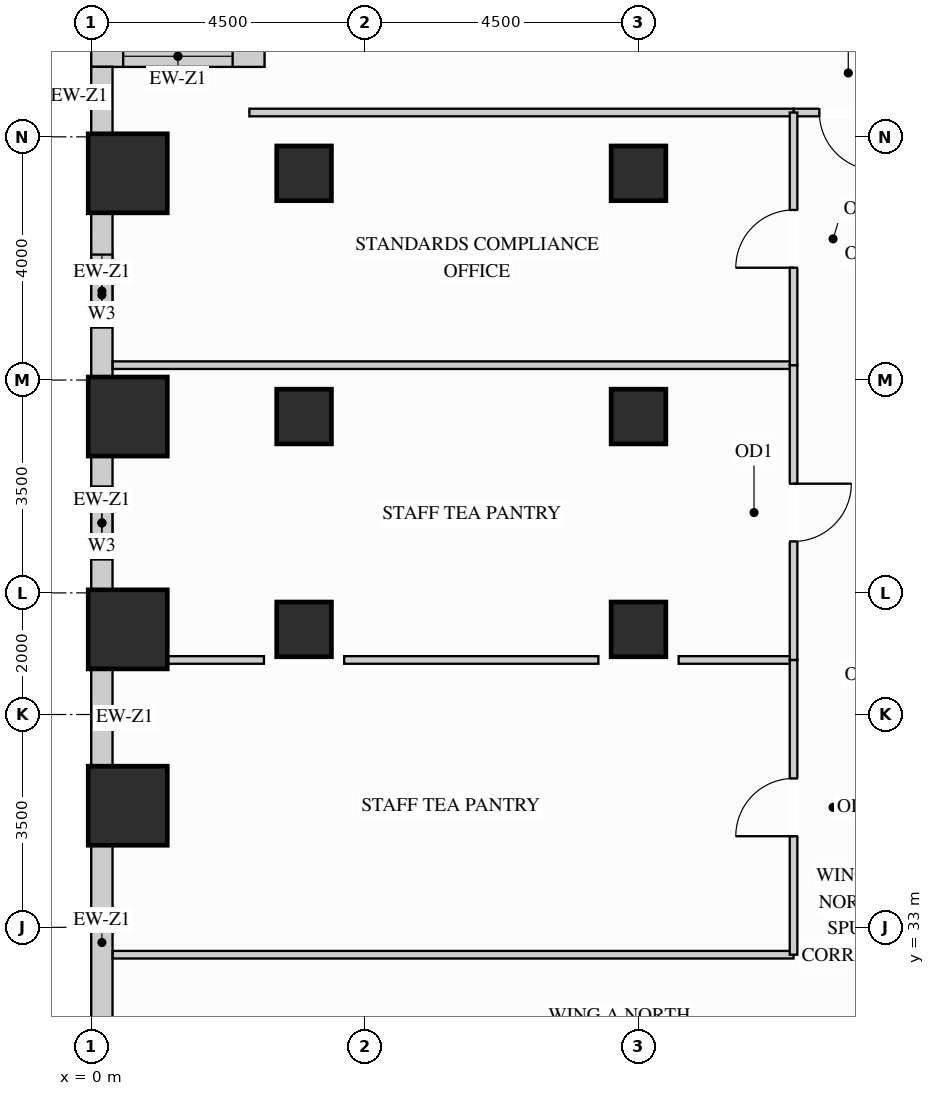
"""IFC4 building model, lengths in metres.
Left out: names, types, materials, properties, quantities, classifications, styles, units other than length and angle.
Written with IfcOpenShell. Run it as: python <this file> out.ifc"""

import sys

from ifc_helpers import new_model, si_unit, direction, frame, frame_2d, origin, origin_2d, place, context, subcontext, project, spatial, rectangle, extrude, source, transform, mapped, element, fill, save


model = new_model("IFC4")
c1 = context("Model", 3, precision=1e-05, world=origin(), true_north=direction((0.0, 1.0)))
c2 = subcontext(c1, "Body", "Model", "MODEL_VIEW")
j1 = project(units=[si_unit("LENGTHUNIT", "METRE"), si_unit("PLANEANGLEUNIT", "RADIAN")], contexts=[c1])
p1 = place(None, origin())
s1 = spatial("IfcSite", under=j1, at=p1, CompositionType="ELEMENT")
p2 = place(p1, origin())
s2 = spatial("IfcBuilding", under=s1, at=p2, CompositionType="ELEMENT")
p3 = place(p2, frame((0.0, 0.0, 26.1)))
s3 = spatial("IfcBuildingStorey", under=s2, at=p3, CompositionType="ELEMENT", Elevation=26.1)
m1 = source(origin(), c2, "Body", "SweptSolid", [
    extrude(rectangle(XDim=0.9, YDim=0.9, at=origin_2d()), origin(), (0.0, 0.0, 1.0), 3.38),
])
for number, where, z_axis, x_axis in (
    (1, (3.5, 37.9, 0.0), (0.0, 0.0, 1.0), (1.0, 0.0, 0.0)),
    (2, (3.5, 41.4, 0.0), (0.0, 0.0, 1.0), (1.0, 0.0, 0.0)),
    (3, (3.5, 45.4, 0.0), (0.0, 0.0, 1.0), (1.0, 0.0, 0.0)),
    (4, (9.0, 37.9, 0.0), (0.0, 0.0, 1.0), (1.0, 0.0, 0.0)),
    (5, (9.0, 41.4, 0.0), (0.0, 0.0, 1.0), (1.0, 0.0, 0.0)),
    (6, (9.0, 45.4, 0.0), (0.0, 0.0, 1.0), (1.0, 0.0, 0.0)),
):
    element("IfcColumn", number, at=place(p3, frame(where, z_axis=z_axis, x_axis=x_axis)), inside=s3, PredefinedType="COLUMN", context=c2, shape_type="MappedRepresentation", body=[
        mapped(m1, transform((0.0, 0.0, 0.0), x_axis=(1.0, 0.0, 0.0), y_axis=(0.0, 1.0, 0.0), z_axis=(0.0, 0.0, 1.0))),
    ])
m2 = source(origin(), c2, "Body", "SweptSolid", [
    extrude(rectangle(XDim=1.3, YDim=1.3, at=origin_2d()), origin(), (0.0, 0.0, 1.0), 3.38),
])
for number, where, z_axis, x_axis in (
    (7, (0.6, 35.0, 0.0), (0.0, 0.0, 1.0), (1.0, 0.0, 0.0)),
    (8, (0.6, 37.9, 0.0), (0.0, 0.0, 1.0), (1.0, 0.0, 0.0)),
    (9, (0.6, 41.4, 0.0), (0.0, 0.0, 1.0), (1.0, 0.0, 0.0)),
    (10, (0.6, 45.4, 0.0), (0.0, 0.0, 1.0), (1.0, 0.0, 0.0)),
):
    element("IfcColumn", number, at=place(p3, frame(where, z_axis=z_axis, x_axis=x_axis)), inside=s3, PredefinedType="COLUMN", context=c2, shape_type="MappedRepresentation", body=[
        mapped(m2, transform((0.0, 0.0, 0.0), x_axis=(1.0, 0.0, 0.0), y_axis=(0.0, 1.0, 0.0), z_axis=(0.0, 0.0, 1.0))),
    ])
p4 = place(p3, frame((2.85, 47.325, 0.0), z_axis=(0.0, 0.0, 1.0), x_axis=(-1.0, 0.0, 0.0)))
e11 = element("IfcWall", 11, at=p4, inside=s3, PredefinedType="SOLIDWALL", context=c2, shape_type="SweptSolid", body=[
    extrude(rectangle(XDim=2.85, YDim=0.35, at=frame_2d((1.425, 0.0))), origin(), (0.0, 0.0, 1.0), 3.365),
])
p5 = place(p4, frame((0.525, 0.0, 0.78)))
e12 = element("IfcOpeningElement", 12, at=p5, cuts=e11, PredefinedType="OPENING", context=c2, shape_type="SweptSolid", body=[
    extrude(rectangle(XDim=1.8, YDim=2.1, at=frame_2d((0.9, 1.05))), frame((0.0, 0.185, 0.0), z_axis=(0.0, -1.0, 0.0), x_axis=(1.0, 0.0, 0.0)), (0.0, 0.0, 1.0), 0.37),
])
m3 = source(origin(), c2, "Body", "SweptSolid", [
    extrude(rectangle(XDim=1.104, YDim=0.35, at=frame_2d((0.552, 0.0))), origin(), (0.0, 0.0, 1.0), 3.365),
])
p6 = place(p3, frame((0.175, 47.152, 0.0), z_axis=(0.0, 0.0, 1.0), x_axis=(0.0, -1.0, 0.0)))
e13 = element("IfcWall", 13, at=p6, inside=s3, PredefinedType="SOLIDWALL", context=c2, shape_type="MappedRepresentation", body=[
    mapped(m3, transform((0.0, 0.0, 0.0), x_axis=(1.0, 0.0, 0.0), y_axis=(0.0, 1.0, 0.0), z_axis=(0.0, 0.0, 1.0))),
])
p7 = place(p3, frame((0.175, 44.752, 0.0), z_axis=(0.0, 0.0, 1.0), x_axis=(0.0, -1.0, 0.0)))
e14 = element("IfcWall", 14, at=p7, inside=s3, PredefinedType="SOLIDWALL", context=c2, shape_type="SweptSolid", body=[
    extrude(rectangle(XDim=2.704, YDim=0.35, at=frame_2d((1.352, 0.0))), origin(), (0.0, 0.0, 1.0), 2.51),
])
p8 = place(p7, frame((0.688, 0.0, 0.78)))
e15 = element("IfcOpeningElement", 15, at=p8, cuts=e14, PredefinedType="OPENING", context=c2, shape_type="SweptSolid", body=[
    extrude(rectangle(XDim=1.2, YDim=1.55, at=frame_2d((0.6, 0.775))), frame((0.0, 0.185, 0.0), z_axis=(0.0, -1.0, 0.0), x_axis=(1.0, 0.0, 0.0)), (0.0, 0.0, 1.0), 0.37),
])
p9 = place(p3, frame((0.175, 40.752, 0.0), z_axis=(0.0, 0.0, 1.0), x_axis=(0.0, -1.0, 0.0)))
e16 = element("IfcWall", 16, at=p9, inside=s3, PredefinedType="SOLIDWALL", context=c2, shape_type="SweptSolid", body=[
    extrude(rectangle(XDim=2.204, YDim=0.35, at=frame_2d((1.102, 0.0))), origin(), (0.0, 0.0, 1.0), 2.51),
])
p10 = place(p9, frame((0.502, 0.0, 0.78)))
e17 = element("IfcOpeningElement", 17, at=p10, cuts=e16, PredefinedType="OPENING", context=c2, shape_type="SweptSolid", body=[
    extrude(rectangle(XDim=1.2, YDim=1.55, at=frame_2d((0.6, 0.775))), frame((0.0, 0.185, 0.0), z_axis=(0.0, -1.0, 0.0), x_axis=(1.0, 0.0, 0.0)), (0.0, 0.0, 1.0), 0.37),
])
m4 = source(origin(), c2, "Body", "SweptSolid", [
    extrude(rectangle(XDim=1.604, YDim=0.35, at=frame_2d((0.802, 0.0))), origin(), (0.0, 0.0, 1.0), 2.51),
])
p11 = place(p3, frame((0.175, 37.252, 0.0), z_axis=(0.0, 0.0, 1.0), x_axis=(0.0, -1.0, 0.0)))
e18 = element("IfcWall", 18, at=p11, inside=s3, PredefinedType="SOLIDWALL", context=c2, shape_type="MappedRepresentation", body=[
    mapped(m4, transform((0.0, 0.0, 0.0), x_axis=(1.0, 0.0, 0.0), y_axis=(0.0, 1.0, 0.0), z_axis=(0.0, 0.0, 1.0))),
])
m5 = source(origin(), c2, "Body", "SweptSolid", [
    extrude(rectangle(XDim=3.204, YDim=0.35, at=frame_2d((1.602, 0.0))), origin(), (0.0, 0.0, 1.0), 2.51),
])
p12 = place(p3, frame((0.175, 34.352, 0.0), z_axis=(0.0, 0.0, 1.0), x_axis=(0.0, -1.0, 0.0)))
e19 = element("IfcWall", 19, at=p12, inside=s3, PredefinedType="SOLIDWALL", context=c2, shape_type="MappedRepresentation", body=[
    mapped(m5, transform((0.0, 0.0, 0.0), x_axis=(1.0, 0.0, 0.0), y_axis=(0.0, 1.0, 0.0), z_axis=(0.0, 0.0, 1.0))),
])
m6 = source(origin(), c2, "Body", "SweptSolid", [
    extrude(rectangle(XDim=11.198, YDim=0.125, at=frame_2d((5.599, 0.0))), origin(), (0.0, 0.0, 1.0), 3.365),
])
p13 = place(p3, frame((0.352, 32.55, 0.0), z_axis=(0.0, 0.0, 1.0), x_axis=(1.0, 0.0, 0.0)))
e20 = element("IfcWall", 20, at=p13, inside=s3, PredefinedType="PARTITIONING", context=c2, shape_type="MappedRepresentation", body=[
    mapped(m6, transform((0.0, 0.0, 0.0), x_axis=(1.0, 0.0, 0.0), y_axis=(0.0, 1.0, 0.0), z_axis=(0.0, 0.0, 1.0))),
])
m7 = source(origin(), c2, "Body", "SweptSolid", [
    extrude(rectangle(XDim=1.58, YDim=0.125, at=frame_2d((0.79, 0.0))), origin(), (0.0, 0.0, 1.0), 3.365),
])
p14 = place(p3, frame((1.26, 37.397, 0.0), z_axis=(0.0, 0.0, 1.0), x_axis=(1.0, 0.0, 0.0)))
e21 = element("IfcWall", 21, at=p14, inside=s3, PredefinedType="PARTITIONING", context=c2, shape_type="MappedRepresentation", body=[
    mapped(m7, transform((0.0, 0.0, 0.0), x_axis=(1.0, 0.0, 0.0), y_axis=(0.0, 1.0, 0.0), z_axis=(0.0, 0.0, 1.0))),
])
m8 = source(origin(), c2, "Body", "SweptSolid", [
    extrude(rectangle(XDim=4.18, YDim=0.125, at=frame_2d((2.09, 0.0))), origin(), (0.0, 0.0, 1.0), 3.365),
])
p15 = place(p3, frame((4.16, 37.397, 0.0), z_axis=(0.0, 0.0, 1.0), x_axis=(1.0, 0.0, 0.0)))
e22 = element("IfcWall", 22, at=p15, inside=s3, PredefinedType="PARTITIONING", context=c2, shape_type="MappedRepresentation", body=[
    mapped(m8, transform((0.0, 0.0, 0.0), x_axis=(1.0, 0.0, 0.0), y_axis=(0.0, 1.0, 0.0), z_axis=(0.0, 0.0, 1.0))),
])
m9 = source(origin(), c2, "Body", "SweptSolid", [
    extrude(rectangle(XDim=1.89, YDim=0.125, at=frame_2d((0.945, 0.0))), origin(), (0.0, 0.0, 1.0), 3.365),
])
p16 = place(p3, frame((9.66, 37.397, 0.0), z_axis=(0.0, 0.0, 1.0), x_axis=(1.0, 0.0, 0.0)))
e23 = element("IfcWall", 23, at=p16, inside=s3, PredefinedType="PARTITIONING", context=c2, shape_type="MappedRepresentation", body=[
    mapped(m9, transform((0.0, 0.0, 0.0), x_axis=(1.0, 0.0, 0.0), y_axis=(0.0, 1.0, 0.0), z_axis=(0.0, 0.0, 1.0))),
])
p17 = place(p3, frame((0.352, 42.245, 0.0), z_axis=(0.0, 0.0, 1.0), x_axis=(1.0, 0.0, 0.0)))
e24 = element("IfcWall", 24, at=p17, inside=s3, PredefinedType="PARTITIONING", context=c2, shape_type="MappedRepresentation", body=[
    mapped(m6, transform((0.0, 0.0, 0.0), x_axis=(1.0, 0.0, 0.0), y_axis=(0.0, 1.0, 0.0), z_axis=(0.0, 0.0, 1.0))),
])
p18 = place(p3, frame((11.55, 46.4, 0.0), z_axis=(0.0, 0.0, 1.0), x_axis=(1.0, 0.0, 0.0)))
e25 = element("IfcWall", 25, at=p18, inside=s3, PredefinedType="PARTITIONING", context=c2, shape_type="SweptSolid", body=[
    extrude(rectangle(XDim=1.8, YDim=0.125, at=frame_2d((0.9, 0.0))), origin(), (0.0, 0.0, 1.0), 3.365),
])
p19 = place(p18, frame((0.425, 0.0, 0.0)))
e26 = element("IfcOpeningElement", 26, at=p19, cuts=e25, PredefinedType="OPENING", context=c2, shape_type="SweptSolid", body=[
    extrude(rectangle(XDim=0.95, YDim=2.15, at=frame_2d((0.475, 1.075))), frame((0.0, 0.073, 0.0), z_axis=(0.0, -1.0, 0.0), x_axis=(1.0, 0.0, 0.0)), (0.0, 0.0, 1.0), 0.145),
])
m10 = source(origin(), c2, "Body", "SweptSolid", [
    extrude(rectangle(XDim=8.95, YDim=0.125, at=frame_2d((4.475, 0.0))), origin(), (0.0, 0.0, 1.0), 3.365),
])
p20 = place(p3, frame((2.6, 46.4, 0.0), z_axis=(0.0, 0.0, 1.0), x_axis=(1.0, 0.0, 0.0)))
e27 = element("IfcWall", 27, at=p20, inside=s3, PredefinedType="PARTITIONING", context=c2, shape_type="MappedRepresentation", body=[
    mapped(m10, transform((0.0, 0.0, 0.0), x_axis=(1.0, 0.0, 0.0), y_axis=(0.0, 1.0, 0.0), z_axis=(0.0, 0.0, 1.0))),
])
p21 = place(p3, frame((11.55, 32.55, 0.0), z_axis=(0.0, 0.0, 1.0), x_axis=(0.0, 1.0, 0.0)))
e28 = element("IfcWall", 28, at=p21, inside=s3, PredefinedType="PARTITIONING", context=c2, shape_type="SweptSolid", body=[
    extrude(rectangle(XDim=4.847, YDim=0.125, at=frame_2d((2.423, 0.0))), origin(), (0.0, 0.0, 1.0), 3.365),
])
p22 = place(p21, frame((1.948, 0.0, 0.0)))
e29 = element("IfcOpeningElement", 29, at=p22, cuts=e28, PredefinedType="OPENING", context=c2, shape_type="SweptSolid", body=[
    extrude(rectangle(XDim=0.95, YDim=2.15, at=frame_2d((0.475, 1.075))), frame((0.0, 0.073, 0.0), z_axis=(0.0, -1.0, 0.0), x_axis=(1.0, 0.0, 0.0)), (0.0, 0.0, 1.0), 0.145),
])
p23 = place(p3, frame((11.55, 37.397, 0.0), z_axis=(0.0, 0.0, 1.0), x_axis=(0.0, 1.0, 0.0)))
e30 = element("IfcWall", 30, at=p23, inside=s3, PredefinedType="PARTITIONING", context=c2, shape_type="SweptSolid", body=[
    extrude(rectangle(XDim=4.848, YDim=0.125, at=frame_2d((2.424, 0.0))), origin(), (0.0, 0.0, 1.0), 3.365),
])
p24 = place(p23, frame((1.949, 0.0, 0.0)))
e31 = element("IfcOpeningElement", 31, at=p24, cuts=e30, PredefinedType="OPENING", context=c2, shape_type="SweptSolid", body=[
    extrude(rectangle(XDim=0.95, YDim=2.15, at=frame_2d((0.475, 1.075))), frame((0.0, 0.073, 0.0), z_axis=(0.0, -1.0, 0.0), x_axis=(1.0, 0.0, 0.0)), (0.0, 0.0, 1.0), 0.145),
])
p25 = place(p3, frame((11.55, 42.245, 0.0), z_axis=(0.0, 0.0, 1.0), x_axis=(0.0, 1.0, 0.0)))
e32 = element("IfcWall", 32, at=p25, inside=s3, PredefinedType="PARTITIONING", context=c2, shape_type="SweptSolid", body=[
    extrude(rectangle(XDim=4.155, YDim=0.125, at=frame_2d((2.077, 0.0))), origin(), (0.0, 0.0, 1.0), 3.365),
])
p26 = place(p25, frame((1.603, 0.0, 0.0)))
e33 = element("IfcOpeningElement", 33, at=p26, cuts=e32, PredefinedType="OPENING", context=c2, shape_type="SweptSolid", body=[
    extrude(rectangle(XDim=0.95, YDim=2.15, at=frame_2d((0.475, 1.075))), frame((0.0, 0.073, 0.0), z_axis=(0.0, -1.0, 0.0), x_axis=(1.0, 0.0, 0.0)), (0.0, 0.0, 1.0), 0.145),
])
m11 = source(origin(), c2, "Body", "SweptSolid", [
    extrude(rectangle(XDim=0.95, YDim=2.15, at=frame_2d((0.475, 1.075))), frame((0.0, 0.025, 0.0), z_axis=(0.0, -1.0, 0.0), x_axis=(1.0, 0.0, 0.0)), (0.0, 0.0, 1.0), 0.05),
])
p27 = place(p19, origin())
e34 = element("IfcDoor", 34, at=p27, inside=s3, OperationType="SINGLE_SWING_RIGHT", PredefinedType="DOOR", context=c2, shape_type="MappedRepresentation", body=[
    mapped(m11, transform((0.0, 0.0, 0.0), x_axis=(1.0, 0.0, 0.0), y_axis=(0.0, 1.0, 0.0), z_axis=(0.0, 0.0, 1.0))),
])
fill(e26, e34)
p28 = place(p22, origin())
e35 = element("IfcDoor", 35, at=p28, inside=s3, OperationType="SINGLE_SWING_LEFT", PredefinedType="DOOR", context=c2, shape_type="MappedRepresentation", body=[
    mapped(m11, transform((0.0, 0.0, 0.0), x_axis=(1.0, 0.0, 0.0), y_axis=(0.0, 1.0, 0.0), z_axis=(0.0, 0.0, 1.0))),
])
fill(e29, e35)
p29 = place(p24, origin())
e36 = element("IfcDoor", 36, at=p29, inside=s3, OperationType="SINGLE_SWING_RIGHT", PredefinedType="DOOR", context=c2, shape_type="MappedRepresentation", body=[
    mapped(m11, transform((0.0, 0.0, 0.0), x_axis=(1.0, 0.0, 0.0), y_axis=(0.0, 1.0, 0.0), z_axis=(0.0, 0.0, 1.0))),
])
fill(e31, e36)
p30 = place(p26, origin())
e37 = element("IfcDoor", 37, at=p30, inside=s3, OperationType="SINGLE_SWING_LEFT", PredefinedType="DOOR", context=c2, shape_type="MappedRepresentation", body=[
    mapped(m11, transform((0.0, 0.0, 0.0), x_axis=(1.0, 0.0, 0.0), y_axis=(0.0, 1.0, 0.0), z_axis=(0.0, 0.0, 1.0))),
])
fill(e33, e37)
m12 = source(origin(), c2, "Body", "SweptSolid", [
    extrude(rectangle(XDim=1.8, YDim=2.1, at=frame_2d((0.9, 1.05))), frame((0.0, 0.03, 0.0), z_axis=(0.0, -1.0, 0.0), x_axis=(1.0, 0.0, 0.0)), (0.0, 0.0, 1.0), 0.06),
])
p31 = place(p5, origin())
e38 = element("IfcWindow", 38, at=p31, inside=s3, PartitioningType="SINGLE_PANEL", PredefinedType="WINDOW", context=c2, shape_type="MappedRepresentation", body=[
    mapped(m12, transform((0.0, 0.0, 0.0), x_axis=(1.0, 0.0, 0.0), y_axis=(0.0, 1.0, 0.0), z_axis=(0.0, 0.0, 1.0))),
])
fill(e12, e38)
m13 = source(origin(), c2, "Body", "SweptSolid", [
    extrude(rectangle(XDim=1.2, YDim=1.55, at=frame_2d((0.6, 0.775))), frame((0.0, 0.03, 0.0), z_axis=(0.0, -1.0, 0.0), x_axis=(1.0, 0.0, 0.0)), (0.0, 0.0, 1.0), 0.06),
])
p32 = place(p8, origin())
e39 = element("IfcWindow", 39, at=p32, inside=s3, PartitioningType="SINGLE_PANEL", PredefinedType="WINDOW", context=c2, shape_type="MappedRepresentation", body=[
    mapped(m13, transform((0.0, 0.0, 0.0), x_axis=(1.0, 0.0, 0.0), y_axis=(0.0, 1.0, 0.0), z_axis=(0.0, 0.0, 1.0))),
])
fill(e15, e39)
p33 = place(p10, origin())
e40 = element("IfcWindow", 40, at=p33, inside=s3, PartitioningType="SINGLE_PANEL", PredefinedType="WINDOW", context=c2, shape_type="MappedRepresentation", body=[
    mapped(m13, transform((0.0, 0.0, 0.0), x_axis=(1.0, 0.0, 0.0), y_axis=(0.0, 1.0, 0.0), z_axis=(0.0, 0.0, 1.0))),
])
fill(e17, e40)
save(model, sys.argv[1])
